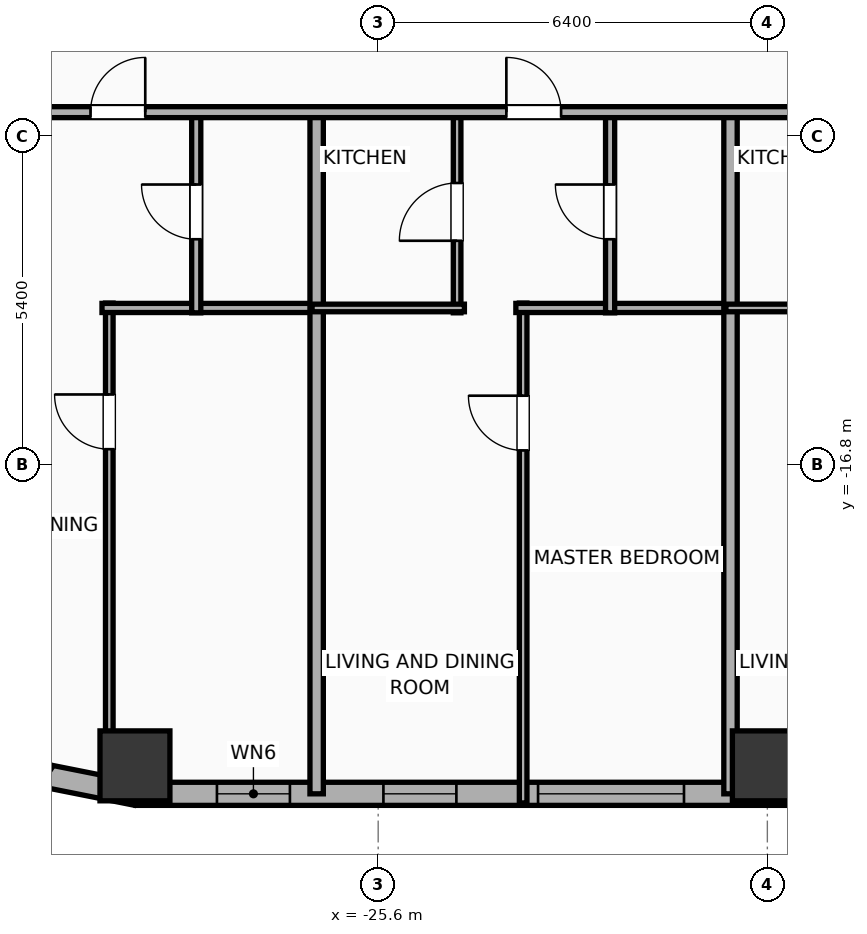
"""IFC4 building model, lengths in metres.
Left out: names, types, materials, properties, quantities, classifications, styles, units other than length and angle.
Written with IfcOpenShell. Run it as: python <this file> out.ifc"""

import sys

from ifc_helpers import new_model, si_unit, direction, frame, frame_2d, origin, origin_2d, place, context, subcontext, project, spatial, rectangle, hollow_rectangle, extrude, element, fill, save


model = new_model("IFC4")
c1 = context("Model", 3, precision=1e-05, world=origin(), true_north=direction((0.0, 1.0)))
c2 = subcontext(c1, "Body", "Model", "MODEL_VIEW")
j1 = project(units=[si_unit("LENGTHUNIT", "METRE"), si_unit("PLANEANGLEUNIT", "RADIAN")], contexts=[c1])
p1 = place(None, origin())
s1 = spatial("IfcSite", under=j1, at=p1, CompositionType="ELEMENT")
p2 = place(p1, origin())
s2 = spatial("IfcBuilding", under=s1, at=p2, CompositionType="ELEMENT")
p3 = place(p2, frame((0.0, 0.0, 65.0)))
s3 = spatial("IfcBuildingStorey", under=s2, at=p3, CompositionType="ELEMENT", Elevation=65.0)
for number, where, z_axis, x_axis in (
    (1, (-29.6, -21.75, 0.0), (0.0, 0.0, 1.0), (1.0, 0.0, 0.0)),
    (2, (-19.2, -21.75, 0.0), (0.0, 0.0, 1.0), (1.0, 0.0, 0.0)),
):
    element("IfcColumn", number, at=place(p3, frame(where, z_axis=z_axis, x_axis=x_axis)), inside=s3, PredefinedType="COLUMN", context=c2, shape_type="SweptSolid", body=[
        extrude(hollow_rectangle(XDim=1.15, YDim=1.15, WallThickness=0.04, at=origin_2d()), origin(), (0.0, 0.0, 1.0), 3.9),
    ])
p4 = place(p3, frame((22.381, -22.21, 0.0), z_axis=(0.0, 0.0, 1.0), x_axis=(-1.0, 0.0, 0.0)))
e3 = element("IfcWall", 3, at=p4, inside=s3, PredefinedType="ELEMENTEDWALL", context=c2, shape_type="SweptSolid", body=[
    extrude(rectangle(XDim=51.963, YDim=0.38, at=frame_2d((25.981, 0.0))), origin(), (0.0, 0.0, 1.0), 3.65),
])
p5 = place(p4, frame((25.631, 0.0, 0.75)))
e4 = element("IfcOpeningElement", 4, at=p5, cuts=e3, PredefinedType="OPENING", context=c2, shape_type="SweptSolid", body=[
    extrude(rectangle(XDim=2.4, YDim=2.1, at=frame_2d((1.2, 1.05))), frame((0.0, 0.2, 0.0), z_axis=(0.0, -1.0, 0.0), x_axis=(1.0, 0.0, 0.0)), (0.0, 0.0, 1.0), 0.4),
])
p6 = place(p4, frame((42.952, 0.0, 0.75)))
e5 = element("IfcOpeningElement", 5, at=p6, cuts=e3, PredefinedType="OPENING", context=c2, shape_type="SweptSolid", body=[
    extrude(rectangle(XDim=2.4, YDim=2.1, at=frame_2d((1.2, 1.05))), frame((0.0, 0.2, 0.0), z_axis=(0.0, -1.0, 0.0), x_axis=(1.0, 0.0, 0.0)), (0.0, 0.0, 1.0), 0.4),
])
p7 = place(p4, frame((49.433, 0.0, 0.75)))
e6 = element("IfcOpeningElement", 6, at=p7, cuts=e3, PredefinedType="OPENING", context=c2, shape_type="SweptSolid", body=[
    extrude(rectangle(XDim=1.2, YDim=2.05, at=frame_2d((0.6, 1.025))), frame((0.0, 0.2, 0.0), z_axis=(0.0, -1.0, 0.0), x_axis=(1.0, 0.0, 0.0)), (0.0, 0.0, 1.0), 0.4),
])
p8 = place(p4, frame((46.695, 0.0, 0.75)))
e7 = element("IfcOpeningElement", 7, at=p8, cuts=e3, PredefinedType="OPENING", context=c2, shape_type="SweptSolid", body=[
    extrude(rectangle(XDim=1.2, YDim=2.05, at=frame_2d((0.6, 1.025))), frame((0.0, 0.2, 0.0), z_axis=(0.0, -1.0, 0.0), x_axis=(1.0, 0.0, 0.0)), (0.0, 0.0, 1.0), 0.4),
])
p9 = place(p4, frame((39.529, 0.0, 0.75)))
e8 = element("IfcOpeningElement", 8, at=p9, cuts=e3, PredefinedType="OPENING", context=c2, shape_type="SweptSolid", body=[
    extrude(rectangle(XDim=1.2, YDim=2.05, at=frame_2d((0.6, 1.025))), frame((0.0, 0.2, 0.0), z_axis=(0.0, -1.0, 0.0), x_axis=(1.0, 0.0, 0.0)), (0.0, 0.0, 1.0), 0.4),
])
p10 = place(p4, frame((36.486, 0.0, 0.75)))
e9 = element("IfcOpeningElement", 9, at=p10, cuts=e3, PredefinedType="OPENING", context=c2, shape_type="SweptSolid", body=[
    extrude(rectangle(XDim=1.2, YDim=2.05, at=frame_2d((0.6, 1.025))), frame((0.0, 0.2, 0.0), z_axis=(0.0, -1.0, 0.0), x_axis=(1.0, 0.0, 0.0)), (0.0, 0.0, 1.0), 0.4),
])
p11 = place(p4, frame((32.986, 0.0, 0.75)))
e10 = element("IfcOpeningElement", 10, at=p11, cuts=e3, PredefinedType="OPENING", context=c2, shape_type="SweptSolid", body=[
    extrude(rectangle(XDim=1.2, YDim=2.05, at=frame_2d((0.6, 1.025))), frame((0.0, 0.2, 0.0), z_axis=(0.0, -1.0, 0.0), x_axis=(1.0, 0.0, 0.0)), (0.0, 0.0, 1.0), 0.4),
])
p12 = place(p4, frame((29.126, 0.0, 0.75)))
e11 = element("IfcOpeningElement", 11, at=p12, cuts=e3, PredefinedType="OPENING", context=c2, shape_type="SweptSolid", body=[
    extrude(rectangle(XDim=1.2, YDim=2.05, at=frame_2d((0.6, 1.025))), frame((0.0, 0.2, 0.0), z_axis=(0.0, -1.0, 0.0), x_axis=(1.0, 0.0, 0.0)), (0.0, 0.0, 1.0), 0.4),
])
p13 = place(p4, frame((22.486, 0.0, 0.75)))
e12 = element("IfcOpeningElement", 12, at=p13, cuts=e3, PredefinedType="OPENING", context=c2, shape_type="SweptSolid", body=[
    extrude(rectangle(XDim=1.2, YDim=2.05, at=frame_2d((0.6, 1.025))), frame((0.0, 0.2, 0.0), z_axis=(0.0, -1.0, 0.0), x_axis=(1.0, 0.0, 0.0)), (0.0, 0.0, 1.0), 0.4),
])
p14 = place(p4, frame((18.746, 0.0, 0.75)))
e13 = element("IfcOpeningElement", 13, at=p14, cuts=e3, PredefinedType="OPENING", context=c2, shape_type="SweptSolid", body=[
    extrude(rectangle(XDim=1.2, YDim=2.05, at=frame_2d((0.6, 1.025))), frame((0.0, 0.2, 0.0), z_axis=(0.0, -1.0, 0.0), x_axis=(1.0, 0.0, 0.0)), (0.0, 0.0, 1.0), 0.4),
])
p15 = place(p4, frame((15.486, 0.0, 0.75)))
e14 = element("IfcOpeningElement", 14, at=p15, cuts=e3, PredefinedType="OPENING", context=c2, shape_type="SweptSolid", body=[
    extrude(rectangle(XDim=1.2, YDim=2.05, at=frame_2d((0.6, 1.025))), frame((0.0, 0.2, 0.0), z_axis=(0.0, -1.0, 0.0), x_axis=(1.0, 0.0, 0.0)), (0.0, 0.0, 1.0), 0.4),
])
p16 = place(p4, frame((11.986, 0.0, 0.75)))
e15 = element("IfcOpeningElement", 15, at=p16, cuts=e3, PredefinedType="OPENING", context=c2, shape_type="SweptSolid", body=[
    extrude(rectangle(XDim=1.2, YDim=2.05, at=frame_2d((0.6, 1.025))), frame((0.0, 0.2, 0.0), z_axis=(0.0, -1.0, 0.0), x_axis=(1.0, 0.0, 0.0)), (0.0, 0.0, 1.0), 0.4),
])
p17 = place(p4, frame((8.366, 0.0, 0.75)))
e16 = element("IfcOpeningElement", 16, at=p17, cuts=e3, PredefinedType="OPENING", context=c2, shape_type="SweptSolid", body=[
    extrude(rectangle(XDim=1.2, YDim=2.05, at=frame_2d((0.6, 1.025))), frame((0.0, 0.2, 0.0), z_axis=(0.0, -1.0, 0.0), x_axis=(1.0, 0.0, 0.0)), (0.0, 0.0, 1.0), 0.4),
])
p18 = place(p4, frame((5.082, 0.0, 0.75)))
e17 = element("IfcOpeningElement", 17, at=p18, cuts=e3, PredefinedType="OPENING", context=c2, shape_type="SweptSolid", body=[
    extrude(rectangle(XDim=1.2, YDim=2.05, at=frame_2d((0.6, 1.025))), frame((0.0, 0.2, 0.0), z_axis=(0.0, -1.0, 0.0), x_axis=(1.0, 0.0, 0.0)), (0.0, 0.0, 1.0), 0.4),
])
p19 = place(p4, frame((2.277, 0.0, 0.75)))
e18 = element("IfcOpeningElement", 18, at=p19, cuts=e3, PredefinedType="OPENING", context=c2, shape_type="SweptSolid", body=[
    extrude(rectangle(XDim=1.2, YDim=2.05, at=frame_2d((0.6, 1.025))), frame((0.0, 0.2, 0.0), z_axis=(0.0, -1.0, 0.0), x_axis=(1.0, 0.0, 0.0)), (0.0, 0.0, 1.0), 0.4),
])
p20 = place(p4, frame((1.071, 0.0, 0.75)))
e19 = element("IfcOpeningElement", 19, at=p20, cuts=e3, PredefinedType="OPENING", context=c2, shape_type="SweptSolid", body=[
    extrude(rectangle(XDim=0.52, YDim=2.05, at=frame_2d((0.26, 1.025))), frame((0.0, 0.2, 0.0), z_axis=(0.0, -1.0, 0.0), x_axis=(1.0, 0.0, 0.0)), (0.0, 0.0, 1.0), 0.4),
])
p21 = place(p3, frame((-29.581, -22.21, 0.0), z_axis=(0.0, 0.0, 1.0), x_axis=(-0.980786132421, 0.195086038585, 0.0)))
e20 = element("IfcWall", 20, at=p21, inside=s3, PredefinedType="ELEMENTEDWALL", context=c2, shape_type="SweptSolid", body=[
    extrude(rectangle(XDim=1.504, YDim=0.38, at=frame_2d((0.752, 0.0))), origin(), (0.0, 0.0, 1.0), 3.65),
])
p22 = place(p3, frame((-31.057, -21.917, 0.0), z_axis=(0.0, 0.0, 1.0), x_axis=(-0.831442848281, 0.555610286119, 0.0)))
e21 = element("IfcWall", 21, at=p22, inside=s3, PredefinedType="ELEMENTEDWALL", context=c2, shape_type="SweptSolid", body=[
    extrude(rectangle(XDim=1.485, YDim=0.38, at=frame_2d((0.743, 0.0))), origin(), (0.0, 0.0, 1.0), 3.65),
])
p23 = place(p3, frame((-30.022, -22.275, 0.0), z_axis=(0.0, 0.0, 1.0), x_axis=(0.0, 1.0, 0.0)))
e22 = element("IfcWall", 22, at=p23, inside=s3, PredefinedType="PARTITIONING", context=c2, shape_type="SweptSolid", body=[
    extrude(rectangle(XDim=8.135, YDim=0.125, at=frame_2d((4.068, 0.0))), origin(), (0.0, 0.0, 1.0), 2.94),
])
p24 = place(p23, frame((5.733, 0.0, 0.0)))
e23 = element("IfcOpeningElement", 23, at=p24, cuts=e22, PredefinedType="OPENING", context=c2, shape_type="SweptSolid", body=[
    extrude(rectangle(XDim=0.9, YDim=2.05, at=frame_2d((0.45, 1.025))), frame((0.0, 0.073, 0.0), z_axis=(0.0, -1.0, 0.0), x_axis=(1.0, 0.0, 0.0)), (0.0, 0.0, 1.0), 0.145),
])
p25 = place(p3, frame((-30.142, -14.22, 0.0), z_axis=(0.0, 0.0, 1.0), x_axis=(1.0, 0.0, 0.0)))
e24 = element("IfcWall", 24, at=p25, inside=s3, PredefinedType="PLUMBINGWALL", context=c2, shape_type="SweptSolid", body=[
    extrude(rectangle(XDim=3.605, YDim=0.15, at=frame_2d((1.802, 0.0))), origin(), (0.0, 0.0, 1.0), 3.65),
])
p26 = place(p3, frame((-28.592, -14.3, 0.0), z_axis=(0.0, 0.0, 1.0), x_axis=(0.0, 1.0, 0.0)))
e25 = element("IfcWall", 25, at=p26, inside=s3, PredefinedType="PLUMBINGWALL", context=c2, shape_type="SweptSolid", body=[
    extrude(rectangle(XDim=3.32, YDim=0.15, at=frame_2d((1.66, 0.0))), origin(), (0.0, 0.0, 1.0), 3.65),
])
p27 = place(p26, frame((1.21, 0.0, 0.0)))
e26 = element("IfcOpeningElement", 26, at=p27, cuts=e25, PredefinedType="OPENING", context=c2, shape_type="SweptSolid", body=[
    extrude(rectangle(XDim=0.9, YDim=2.05, at=frame_2d((0.45, 1.025))), frame((0.0, 0.085, 0.0), z_axis=(0.0, -1.0, 0.0), x_axis=(1.0, 0.0, 0.0)), (0.0, 0.0, 1.0), 0.17),
])
p28 = place(p3, frame((-26.612, -22.21, 0.0), z_axis=(0.0, 0.0, 1.0), x_axis=(0.0, 1.0, 0.0)))
e27 = element("IfcWall", 27, at=p28, inside=s3, PredefinedType="PARTITIONING", context=c2, shape_type="SweptSolid", body=[
    extrude(rectangle(XDim=11.29, YDim=0.22, at=frame_2d((5.645, 0.0))), origin(), (0.0, 0.0, 1.0), 3.65),
])
p29 = place(p3, frame((-23.216, -22.36, 0.0), z_axis=(0.0, 0.0, 1.0), x_axis=(0.0, 1.0, 0.0)))
e28 = element("IfcWall", 28, at=p29, inside=s3, PredefinedType="PARTITIONING", context=c2, shape_type="SweptSolid", body=[
    extrude(rectangle(XDim=8.22, YDim=0.125, at=frame_2d((4.11, 0.0))), origin(), (0.0, 0.0, 1.0), 3.65),
])
p30 = place(p29, frame((5.797, 0.0, 0.0)))
e29 = element("IfcOpeningElement", 29, at=p30, cuts=e28, PredefinedType="OPENING", context=c2, shape_type="SweptSolid", body=[
    extrude(rectangle(XDim=0.9, YDim=2.05, at=frame_2d((0.45, 1.025))), frame((0.0, 0.073, 0.0), z_axis=(0.0, -1.0, 0.0), x_axis=(1.0, 0.0, 0.0)), (0.0, 0.0, 1.0), 0.145),
])
p31 = place(p3, frame((-23.336, -14.22, 0.0), z_axis=(0.0, 0.0, 1.0), x_axis=(1.0, 0.0, 0.0)))
e30 = element("IfcWall", 30, at=p31, inside=s3, PredefinedType="PLUMBINGWALL", context=c2, shape_type="SweptSolid", body=[
    extrude(rectangle(XDim=3.605, YDim=0.15, at=frame_2d((1.802, 0.0))), origin(), (0.0, 0.0, 1.0), 3.65),
])
p32 = place(p3, frame((-24.302, -14.3, 0.0), z_axis=(0.0, 0.0, 1.0), x_axis=(0.0, 1.0, 0.0)))
e31 = element("IfcWall", 31, at=p32, inside=s3, PredefinedType="PARTITIONING", context=c2, shape_type="SweptSolid", body=[
    extrude(rectangle(XDim=3.32, YDim=0.125, at=frame_2d((1.66, 0.0))), origin(), (0.0, 0.0, 1.0), 3.65),
])
p33 = place(p32, frame((1.185, 0.0, 0.0)))
e32 = element("IfcOpeningElement", 32, at=p33, cuts=e31, PredefinedType="OPENING", context=c2, shape_type="SweptSolid", body=[
    extrude(rectangle(XDim=0.95, YDim=2.05, at=frame_2d((0.475, 1.025))), frame((0.0, 0.073, 0.0), z_axis=(0.0, -1.0, 0.0), x_axis=(1.0, 0.0, 0.0)), (0.0, 0.0, 1.0), 0.145),
])
p34 = place(p3, frame((-26.687, -14.22, 0.0), z_axis=(0.0, 0.0, 1.0), x_axis=(1.0, 0.0, 0.0)))
e33 = element("IfcWall", 33, at=p34, inside=s3, PredefinedType="PARTITIONING", context=c2, shape_type="SweptSolid", body=[
    extrude(rectangle(XDim=2.505, YDim=0.125, at=frame_2d((1.252, 0.0))), origin(), (0.0, 0.0, 1.0), 3.65),
])
p35 = place(p3, frame((-21.786, -14.3, 0.0), z_axis=(0.0, 0.0, 1.0), x_axis=(0.0, 1.0, 0.0)))
e34 = element("IfcWall", 34, at=p35, inside=s3, PredefinedType="PLUMBINGWALL", context=c2, shape_type="SweptSolid", body=[
    extrude(rectangle(XDim=3.32, YDim=0.15, at=frame_2d((1.66, 0.0))), origin(), (0.0, 0.0, 1.0), 3.65),
])
p36 = place(p35, frame((1.21, 0.0, 0.0)))
e35 = element("IfcOpeningElement", 35, at=p36, cuts=e34, PredefinedType="OPENING", context=c2, shape_type="SweptSolid", body=[
    extrude(rectangle(XDim=0.9, YDim=2.05, at=frame_2d((0.45, 1.025))), frame((0.0, 0.085, 0.0), z_axis=(0.0, -1.0, 0.0), x_axis=(1.0, 0.0, 0.0)), (0.0, 0.0, 1.0), 0.17),
])
p37 = place(p3, frame((-19.806, -22.21, 0.0), z_axis=(0.0, 0.0, 1.0), x_axis=(0.0, 1.0, 0.0)))
e36 = element("IfcWall", 36, at=p37, inside=s3, PredefinedType="PARTITIONING", context=c2, shape_type="SweptSolid", body=[
    extrude(rectangle(XDim=11.29, YDim=0.22, at=frame_2d((5.645, 0.0))), origin(), (0.0, 0.0, 1.0), 3.65),
])
p38 = place(p3, frame((-19.881, -14.22, 0.0), z_axis=(0.0, 0.0, 1.0), x_axis=(1.0, 0.0, 0.0)))
e37 = element("IfcWall", 37, at=p38, inside=s3, PredefinedType="PARTITIONING", context=c2, shape_type="SweptSolid", body=[
    extrude(rectangle(XDim=2.505, YDim=0.125, at=frame_2d((1.252, 0.0))), origin(), (0.0, 0.0, 1.0), 3.65),
])
p39 = place(p3, frame((-33.41, -11.0, 0.0), z_axis=(0.0, 0.0, 1.0), x_axis=(1.0, 0.0, 0.0)))
e38 = element("IfcWall", 38, at=p39, inside=s3, PredefinedType="PARTITIONING", context=c2, shape_type="SweptSolid", body=[
    extrude(rectangle(XDim=59.62, YDim=0.18, at=frame_2d((29.81, 0.0))), origin(), (0.0, 0.0, 1.0), 3.65),
])
p40 = place(p39, frame((3.08, 0.0, 0.0)))
e39 = element("IfcOpeningElement", 39, at=p40, cuts=e38, PredefinedType="OPENING", context=c2, shape_type="SweptSolid", body=[
    extrude(rectangle(XDim=0.9, YDim=2.05, at=frame_2d((0.45, 1.025))), frame((0.0, 0.1, 0.0), z_axis=(0.0, -1.0, 0.0), x_axis=(1.0, 0.0, 0.0)), (0.0, 0.0, 1.0), 0.2),
])
p41 = place(p39, frame((9.918, 0.0, 0.0)))
e40 = element("IfcOpeningElement", 40, at=p41, cuts=e38, PredefinedType="OPENING", context=c2, shape_type="SweptSolid", body=[
    extrude(rectangle(XDim=0.9, YDim=2.05, at=frame_2d((0.45, 1.025))), frame((0.0, 0.1, 0.0), z_axis=(0.0, -1.0, 0.0), x_axis=(1.0, 0.0, 0.0)), (0.0, 0.0, 1.0), 0.2),
])
p42 = place(p39, frame((16.721, 0.0, 0.0)))
e41 = element("IfcOpeningElement", 41, at=p42, cuts=e38, PredefinedType="OPENING", context=c2, shape_type="SweptSolid", body=[
    extrude(rectangle(XDim=0.9, YDim=2.05, at=frame_2d((0.45, 1.025))), frame((0.0, 0.1, 0.0), z_axis=(0.0, -1.0, 0.0), x_axis=(1.0, 0.0, 0.0)), (0.0, 0.0, 1.0), 0.2),
])
p43 = place(p39, frame((23.625, 0.0, 0.0)))
e42 = element("IfcOpeningElement", 42, at=p43, cuts=e38, PredefinedType="OPENING", context=c2, shape_type="SweptSolid", body=[
    extrude(rectangle(XDim=0.9, YDim=2.05, at=frame_2d((0.45, 1.025))), frame((0.0, 0.1, 0.0), z_axis=(0.0, -1.0, 0.0), x_axis=(1.0, 0.0, 0.0)), (0.0, 0.0, 1.0), 0.2),
])
p44 = place(p39, frame((30.624, 0.0, 0.0)))
e43 = element("IfcOpeningElement", 43, at=p44, cuts=e38, PredefinedType="OPENING", context=c2, shape_type="SweptSolid", body=[
    extrude(rectangle(XDim=0.9, YDim=2.05, at=frame_2d((0.45, 1.025))), frame((0.0, 0.1, 0.0), z_axis=(0.0, -1.0, 0.0), x_axis=(1.0, 0.0, 0.0)), (0.0, 0.0, 1.0), 0.2),
])
p45 = place(p39, frame((37.623, 0.0, 0.0)))
e44 = element("IfcOpeningElement", 44, at=p45, cuts=e38, PredefinedType="OPENING", context=c2, shape_type="SweptSolid", body=[
    extrude(rectangle(XDim=0.9, YDim=2.05, at=frame_2d((0.45, 1.025))), frame((0.0, 0.1, 0.0), z_axis=(0.0, -1.0, 0.0), x_axis=(1.0, 0.0, 0.0)), (0.0, 0.0, 1.0), 0.2),
])
p46 = place(p39, frame((44.623, 0.0, 0.0)))
e45 = element("IfcOpeningElement", 45, at=p46, cuts=e38, PredefinedType="OPENING", context=c2, shape_type="SweptSolid", body=[
    extrude(rectangle(XDim=0.9, YDim=2.05, at=frame_2d((0.45, 1.025))), frame((0.0, 0.1, 0.0), z_axis=(0.0, -1.0, 0.0), x_axis=(1.0, 0.0, 0.0)), (0.0, 0.0, 1.0), 0.2),
])
p47 = place(p39, frame((49.565, 0.0, 0.0)))
e46 = element("IfcOpeningElement", 46, at=p47, cuts=e38, PredefinedType="OPENING", context=c2, shape_type="SweptSolid", body=[
    extrude(rectangle(XDim=1.15, YDim=2.05, at=frame_2d((0.575, 1.025))), frame((0.0, 0.1, 0.0), z_axis=(0.0, -1.0, 0.0), x_axis=(1.0, 0.0, 0.0)), (0.0, 0.0, 1.0), 0.2),
])
p48 = place(p39, frame((56.583, 0.0, 0.0)))
e47 = element("IfcOpeningElement", 47, at=p48, cuts=e38, PredefinedType="OPENING", context=c2, shape_type="SweptSolid", body=[
    extrude(rectangle(XDim=0.9, YDim=2.05, at=frame_2d((0.45, 1.025))), frame((0.0, 0.1, 0.0), z_axis=(0.0, -1.0, 0.0), x_axis=(1.0, 0.0, 0.0)), (0.0, 0.0, 1.0), 0.2),
])
p49 = place(p6, origin())
e48 = element("IfcWindow", 48, at=p49, inside=s3, PartitioningType="SINGLE_PANEL", PredefinedType="WINDOW", context=c2, shape_type="SweptSolid", body=[
    extrude(rectangle(XDim=2.4, YDim=2.1, at=frame_2d((1.2, 1.05))), frame((0.0, 0.03, 0.0), z_axis=(0.0, -1.0, 0.0), x_axis=(1.0, 0.0, 0.0)), (0.0, 0.0, 1.0), 0.06),
])
fill(e5, e48)
p50 = place(p7, origin())
e49 = element("IfcWindow", 49, at=p50, inside=s3, PartitioningType="SINGLE_PANEL", PredefinedType="WINDOW", context=c2, shape_type="SweptSolid", body=[
    extrude(rectangle(XDim=1.2, YDim=2.05, at=frame_2d((0.6, 1.025))), frame((0.0, 0.03, 0.0), z_axis=(0.0, -1.0, 0.0), x_axis=(1.0, 0.0, 0.0)), (0.0, 0.0, 1.0), 0.06),
])
fill(e6, e49)
p51 = place(p8, origin())
e50 = element("IfcWindow", 50, at=p51, inside=s3, PartitioningType="SINGLE_PANEL", PredefinedType="WINDOW", context=c2, shape_type="SweptSolid", body=[
    extrude(rectangle(XDim=1.2, YDim=2.05, at=frame_2d((0.6, 1.025))), frame((0.0, 0.03, 0.0), z_axis=(0.0, -1.0, 0.0), x_axis=(1.0, 0.0, 0.0)), (0.0, 0.0, 1.0), 0.06),
])
fill(e7, e50)
p52 = place(p24, origin())
e51 = element("IfcDoor", 51, at=p52, inside=s3, OperationType="SINGLE_SWING_RIGHT", PredefinedType="DOOR", context=c2, shape_type="SweptSolid", body=[
    extrude(rectangle(XDim=0.9, YDim=2.05, at=frame_2d((0.45, 1.025))), frame((0.0, 0.025, 0.0), z_axis=(0.0, -1.0, 0.0), x_axis=(1.0, 0.0, 0.0)), (0.0, 0.0, 1.0), 0.05),
])
fill(e23, e51)
p53 = place(p27, origin())
e52 = element("IfcDoor", 52, at=p53, inside=s3, OperationType="SINGLE_SWING_RIGHT", PredefinedType="DOOR", context=c2, shape_type="SweptSolid", body=[
    extrude(rectangle(XDim=0.9, YDim=2.05, at=frame_2d((0.45, 1.025))), frame((0.0, 0.025, 0.0), z_axis=(0.0, -1.0, 0.0), x_axis=(1.0, 0.0, 0.0)), (0.0, 0.0, 1.0), 0.05),
])
fill(e26, e52)
p54 = place(p30, origin())
e53 = element("IfcDoor", 53, at=p54, inside=s3, OperationType="SINGLE_SWING_RIGHT", PredefinedType="DOOR", context=c2, shape_type="SweptSolid", body=[
    extrude(rectangle(XDim=0.9, YDim=2.05, at=frame_2d((0.45, 1.025))), frame((0.0, 0.025, 0.0), z_axis=(0.0, -1.0, 0.0), x_axis=(1.0, 0.0, 0.0)), (0.0, 0.0, 1.0), 0.05),
])
fill(e29, e53)
p55 = place(p33, origin())
e54 = element("IfcDoor", 54, at=p55, inside=s3, OperationType="SINGLE_SWING_LEFT", PredefinedType="DOOR", context=c2, shape_type="SweptSolid", body=[
    extrude(rectangle(XDim=0.95, YDim=2.05, at=frame_2d((0.475, 1.025))), frame((0.0, 0.025, 0.0), z_axis=(0.0, -1.0, 0.0), x_axis=(1.0, 0.0, 0.0)), (0.0, 0.0, 1.0), 0.05),
])
fill(e32, e54)
p56 = place(p36, origin())
e55 = element("IfcDoor", 55, at=p56, inside=s3, OperationType="SINGLE_SWING_RIGHT", PredefinedType="DOOR", context=c2, shape_type="SweptSolid", body=[
    extrude(rectangle(XDim=0.9, YDim=2.05, at=frame_2d((0.45, 1.025))), frame((0.0, 0.025, 0.0), z_axis=(0.0, -1.0, 0.0), x_axis=(1.0, 0.0, 0.0)), (0.0, 0.0, 1.0), 0.05),
])
fill(e35, e55)
p57 = place(p40, origin())
e56 = element("IfcDoor", 56, at=p57, inside=s3, OperationType="SINGLE_SWING_RIGHT", PredefinedType="DOOR", context=c2, shape_type="SweptSolid", body=[
    extrude(rectangle(XDim=0.9, YDim=2.05, at=frame_2d((0.45, 1.025))), frame((0.0, 0.025, 0.0), z_axis=(0.0, -1.0, 0.0), x_axis=(1.0, 0.0, 0.0)), (0.0, 0.0, 1.0), 0.05),
])
fill(e39, e56)
p58 = place(p41, origin())
e57 = element("IfcDoor", 57, at=p58, inside=s3, OperationType="SINGLE_SWING_LEFT", PredefinedType="DOOR", context=c2, shape_type="SweptSolid", body=[
    extrude(rectangle(XDim=0.9, YDim=2.05, at=frame_2d((0.45, 1.025))), frame((0.0, 0.025, 0.0), z_axis=(0.0, -1.0, 0.0), x_axis=(1.0, 0.0, 0.0)), (0.0, 0.0, 1.0), 0.05),
])
fill(e40, e57)
save(model, sys.argv[1])
